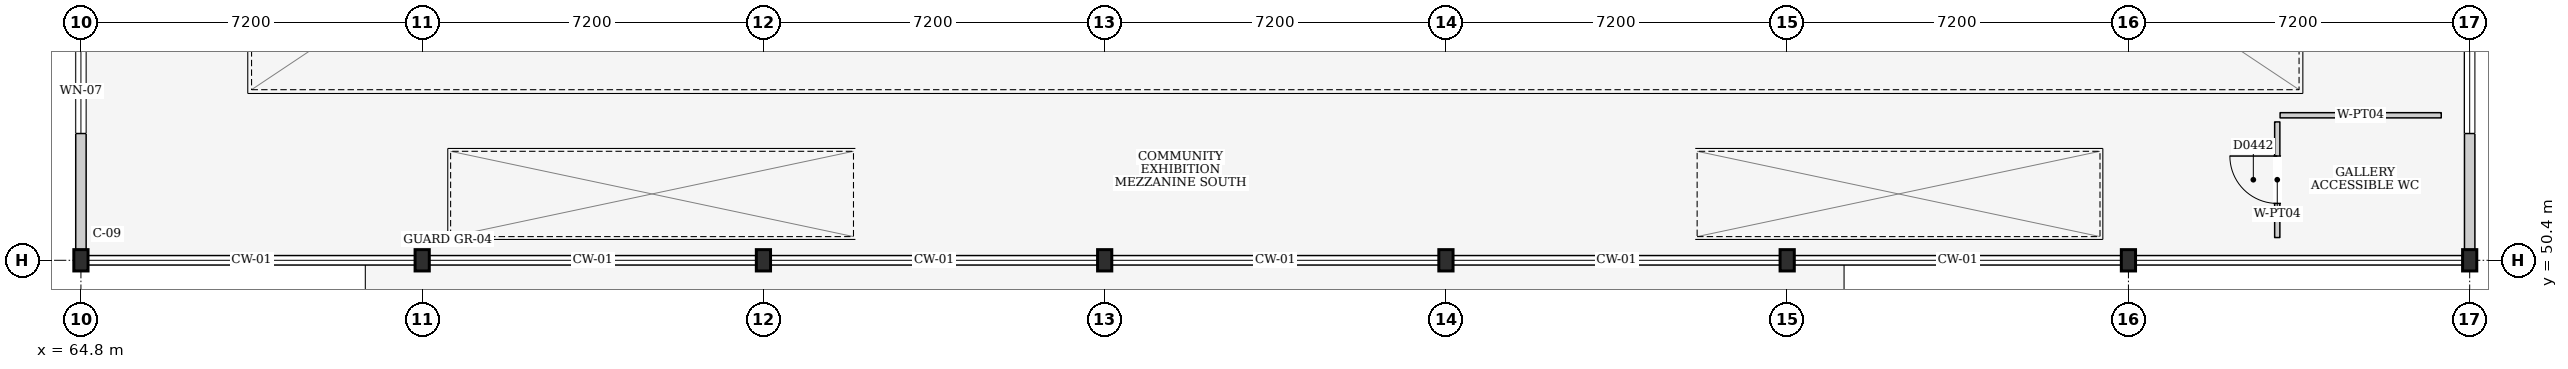
"""IFC4 building model, lengths in metres.
Left out: names, types, materials, properties, quantities, classifications, styles, units other than length and angle.
Written with IfcOpenShell. Run it as: python <this file> out.ifc"""

import sys

from ifc_helpers import new_model, si_unit, direction, frame, frame_2d, origin, origin_2d, place, context, subcontext, project, spatial, rectangle, i_section, extrude, element, fill, save


model = new_model("IFC4")
c1 = context("Model", 3, precision=1e-05, world=origin(), true_north=direction((0.0, 1.0)))
c2 = subcontext(c1, "Body", "Model", "MODEL_VIEW")
j1 = project(units=[si_unit("LENGTHUNIT", "METRE"), si_unit("PLANEANGLEUNIT", "RADIAN")], contexts=[c1])
p1 = place(None, origin())
s1 = spatial("IfcSite", under=j1, at=p1, CompositionType="ELEMENT")
p2 = place(p1, origin())
s2 = spatial("IfcBuilding", under=s1, at=p2, CompositionType="ELEMENT")
p3 = place(p2, frame((0.0, 0.0, 4.5)))
s3 = spatial("IfcBuildingStorey", under=s2, at=p3, CompositionType="ELEMENT", Elevation=4.5)
for number, where, z_axis, x_axis in (
    (1, (64.8, 50.4, 0.0), (0.0, 0.0, 1.0), (1.0, 0.0, 0.0)),
    (2, (72.0, 50.4, 0.0), (0.0, 0.0, 1.0), (1.0, 0.0, 0.0)),
    (3, (79.2, 50.4, 0.0), (0.0, 0.0, 1.0), (1.0, 0.0, 0.0)),
    (4, (86.4, 50.4, 0.0), (0.0, 0.0, 1.0), (1.0, 0.0, 0.0)),
    (5, (93.6, 50.4, 0.0), (0.0, 0.0, 1.0), (1.0, 0.0, 0.0)),
    (6, (100.8, 50.4, 0.0), (0.0, 0.0, 1.0), (1.0, 0.0, 0.0)),
    (7, (108.0, 50.4, 0.0), (0.0, 0.0, 1.0), (1.0, 0.0, 0.0)),
    (8, (115.2, 50.4, 0.0), (0.0, 0.0, 1.0), (1.0, 0.0, 0.0)),
):
    element("IfcColumn", number, at=place(p3, frame(where, z_axis=z_axis, x_axis=x_axis)), inside=s3, PredefinedType="COLUMN", context=c2, shape_type="SweptSolid", body=[
        extrude(i_section(OverallWidth=0.3, OverallDepth=0.45, WebThickness=0.014, FlangeThickness=0.026, at=origin_2d()), origin(), (0.0, 0.0, 1.0), 4.5),
    ])
p4 = place(p3, frame((64.8, 50.625, 0.0), z_axis=(0.0, 0.0, 1.0), x_axis=(0.0, 1.0, 0.0)))
e9 = element("IfcWall", 9, at=p4, inside=s3, PredefinedType="ELEMENTEDWALL", context=c2, shape_type="SweptSolid", body=[
    extrude(rectangle(XDim=6.75, YDim=0.22, at=frame_2d((3.375, 0.0))), origin(), (0.0, 0.0, 1.0), 6.95),
])
p5 = place(p4, frame((2.45, 0.0, 0.95)))
e10 = element("IfcOpeningElement", 10, at=p5, cuts=e9, PredefinedType="OPENING", context=c2, shape_type="SweptSolid", body=[
    extrude(rectangle(XDim=1.8, YDim=1.8, at=frame_2d((0.9, 0.9))), frame((0.0, 0.125, 0.0), z_axis=(0.0, -1.0, 0.0), x_axis=(1.0, 0.0, 0.0)), (0.0, 0.0, 1.0), 0.25),
])
p6 = place(p3, frame((115.2, 50.625, 0.0), z_axis=(0.0, 0.0, 1.0), x_axis=(0.0, 1.0, 0.0)))
e11 = element("IfcWall", 11, at=p6, inside=s3, PredefinedType="ELEMENTEDWALL", context=c2, shape_type="SweptSolid", body=[
    extrude(rectangle(XDim=6.75, YDim=0.22, at=frame_2d((3.375, 0.0))), origin(), (0.0, 0.0, 1.0), 6.95),
])
p7 = place(p6, frame((2.45, 0.0, 0.95)))
e12 = element("IfcOpeningElement", 12, at=p7, cuts=e11, PredefinedType="OPENING", context=c2, shape_type="SweptSolid", body=[
    extrude(rectangle(XDim=1.8, YDim=1.8, at=frame_2d((0.9, 0.9))), frame((0.0, 0.125, 0.0), z_axis=(0.0, -1.0, 0.0), x_axis=(1.0, 0.0, 0.0)), (0.0, 0.0, 1.0), 0.25),
])
p8 = place(p3, frame((111.2, 53.46, 0.0), z_axis=(0.0, 0.0, 1.0), x_axis=(1.0, 0.0, 0.0)))
e13 = element("IfcWall", 13, at=p8, inside=s3, PredefinedType="PARTITIONING", context=c2, shape_type="SweptSolid", body=[
    extrude(rectangle(XDim=3.4, YDim=0.11, at=frame_2d((1.7, 0.0))), origin(), (0.0, 0.0, 1.0), 4.25),
])
p9 = place(p3, frame((111.14, 50.88, 0.0), z_axis=(0.0, 0.0, 1.0), x_axis=(0.0, 1.0, 0.0)))
e14 = element("IfcWall", 14, at=p9, inside=s3, PredefinedType="PARTITIONING", context=c2, shape_type="SweptSolid", body=[
    extrude(rectangle(XDim=2.44, YDim=0.11, at=frame_2d((1.22, 0.0))), origin(), (0.0, 0.0, 1.0), 4.25),
])
p10 = place(p9, frame((0.72, 0.0, 0.0)))
e15 = element("IfcOpeningElement", 15, at=p10, cuts=e14, PredefinedType="OPENING", context=c2, shape_type="SweptSolid", body=[
    extrude(rectangle(XDim=1.0, YDim=2.1, at=frame_2d((0.5, 1.05))), frame((0.0, 0.07, 0.0), z_axis=(0.0, -1.0, 0.0), x_axis=(1.0, 0.0, 0.0)), (0.0, 0.0, 1.0), 0.14),
])
p11 = place(p5, origin())
e16 = element("IfcWindow", 16, at=p11, inside=s3, PartitioningType="DOUBLE_PANEL_VERTICAL", PredefinedType="WINDOW", context=c2, shape_type="SweptSolid", body=[
    extrude(rectangle(XDim=1.8, YDim=1.8, at=frame_2d((0.9, 0.9))), frame((0.0, 0.03, 0.0), z_axis=(0.0, -1.0, 0.0), x_axis=(1.0, 0.0, 0.0)), (0.0, 0.0, 1.0), 0.06),
])
fill(e10, e16)
p12 = place(p7, origin())
e17 = element("IfcWindow", 17, at=p12, inside=s3, PartitioningType="DOUBLE_PANEL_VERTICAL", PredefinedType="WINDOW", context=c2, shape_type="SweptSolid", body=[
    extrude(rectangle(XDim=1.8, YDim=1.8, at=frame_2d((0.9, 0.9))), frame((0.0, 0.03, 0.0), z_axis=(0.0, -1.0, 0.0), x_axis=(1.0, 0.0, 0.0)), (0.0, 0.0, 1.0), 0.06),
])
fill(e12, e17)
p13 = place(p10, origin())
e18 = element("IfcDoor", 18, at=p13, inside=s3, OperationType="SINGLE_SWING_RIGHT", PredefinedType="DOOR", context=c2, shape_type="SweptSolid", body=[
    extrude(rectangle(XDim=1.0, YDim=2.1, at=frame_2d((0.5, 1.05))), frame((0.0, 0.025, 0.0), z_axis=(0.0, -1.0, 0.0), x_axis=(1.0, 0.0, 0.0)), (0.0, 0.0, 1.0), 0.05),
])
fill(e15, e18)
save(model, sys.argv[1])
